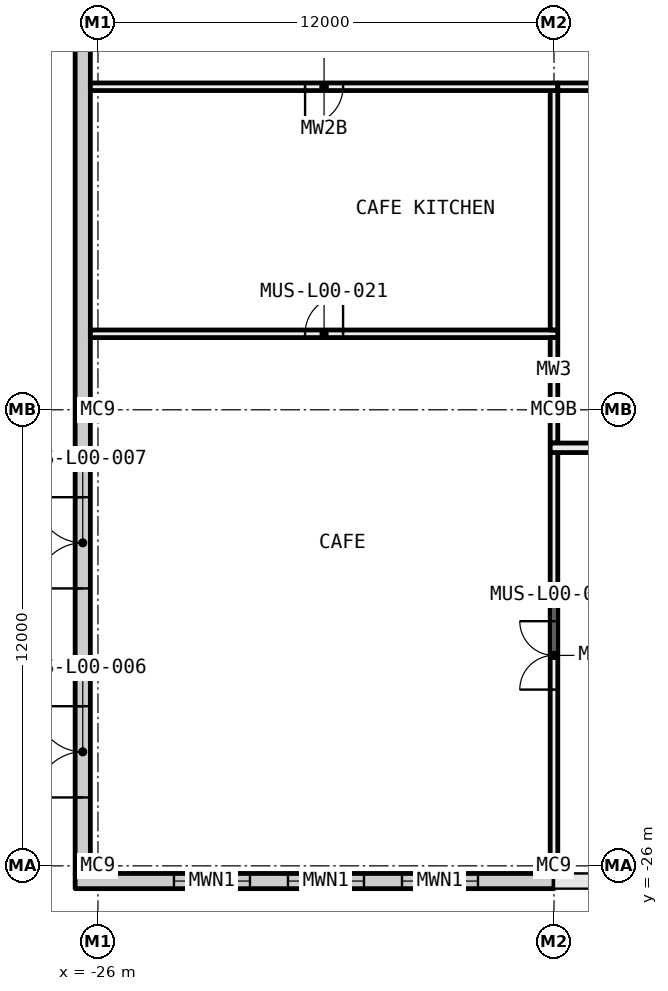
"""IFC4 building model, lengths in metres.
Left out: names, types, materials, properties, quantities, classifications, styles, units other than length and angle.
Written with IfcOpenShell. Run it as: python <this file> out.ifc"""

import sys

from ifc_helpers import new_model, si_unit, direction, frame, frame_2d, origin, origin_2d, place, context, subcontext, project, spatial, rectangle, i_section, extrude, element, fill, save


model = new_model("IFC4")
c1 = context("Model", 3, precision=1e-05, world=origin(), true_north=direction((0.0, 1.0)))
c2 = subcontext(c1, "Body", "Model", "MODEL_VIEW")
j1 = project(units=[si_unit("LENGTHUNIT", "METRE"), si_unit("PLANEANGLEUNIT", "RADIAN")], contexts=[c1])
p1 = place(None, origin())
s1 = spatial("IfcSite", under=j1, at=p1, CompositionType="ELEMENT")
p2 = place(p1, origin())
s2 = spatial("IfcBuilding", under=s1, at=p2, CompositionType="ELEMENT")
p3 = place(p2, origin())
s3 = spatial("IfcBuildingStorey", under=s2, at=p3, CompositionType="ELEMENT", Elevation=0.0)
for number, where, z_axis, x_axis in (
    (1, (-26.0, -26.0, -1.0), (0.0, 0.0, 1.0), (1.0, 0.0, 0.0)),
    (2, (-26.0, -14.0, -1.0), (0.0, 0.0, 1.0), (1.0, 0.0, 0.0)),
    (3, (-14.0, -26.0, -1.0), (0.0, 0.0, 1.0), (1.0, 0.0, 0.0)),
    (4, (-14.0, -14.0, -1.0), (0.0, 0.0, 1.0), (1.0, 0.0, 0.0)),
):
    element("IfcColumn", number, at=place(p3, frame(where, z_axis=z_axis, x_axis=x_axis)), inside=s3, PredefinedType="COLUMN", context=c2, shape_type="SweptSolid", body=[
        extrude(i_section(OverallWidth=0.4, OverallDepth=0.4, WebThickness=0.013, FlangeThickness=0.021, FilletRadius=0.022, at=origin_2d()), origin(), (0.0, 0.0, 1.0), 6.6),
    ])
p4 = place(p3, frame((-26.2, -12.0, 0.0), z_axis=(0.0, 0.0, 1.0), x_axis=(1.0, 0.0, 0.0)))
e5 = element("IfcWall", 5, at=p4, inside=s3, PredefinedType="PARTITIONING", context=c2, shape_type="SweptSolid", body=[
    extrude(rectangle(XDim=12.3, YDim=0.2, at=frame_2d((6.15, 0.0))), origin(), (0.0, 0.0, 1.0), 5.6),
])
p5 = place(p4, frame((5.65, 0.0, 0.0)))
e6 = element("IfcOpeningElement", 6, at=p5, cuts=e5, PredefinedType="OPENING", context=c2, shape_type="SweptSolid", body=[
    extrude(rectangle(XDim=1.0, YDim=2.1, at=frame_2d((0.5, 1.05))), frame((0.0, 0.11, 0.0), z_axis=(0.0, -1.0, 0.0), x_axis=(1.0, 0.0, 0.0)), (0.0, 0.0, 1.0), 0.22),
])
p6 = place(p3, frame((-14.0, -14.875, 0.0), z_axis=(0.0, 0.0, 1.0), x_axis=(0.0, 1.0, 0.0)))
e7 = element("IfcWall", 7, at=p6, inside=s3, PredefinedType="PARTITIONING", context=c2, shape_type="SweptSolid", body=[
    extrude(rectangle(XDim=0.675, YDim=0.2, at=frame_2d((0.337, 0.0))), origin(), (0.0, 0.0, 1.0), 5.012),
])
p7 = place(p3, frame((-14.0, -13.8, 0.0), z_axis=(0.0, 0.0, 1.0), x_axis=(0.0, 1.0, 0.0)))
e8 = element("IfcWall", 8, at=p7, inside=s3, PredefinedType="PARTITIONING", context=c2, shape_type="SweptSolid", body=[
    extrude(rectangle(XDim=1.7, YDim=0.2, at=frame_2d((0.85, 0.0))), origin(), (0.0, 0.0, 1.0), 5.012),
])
p8 = place(p3, frame((-14.0, -11.9, 0.0), z_axis=(0.0, 0.0, 1.0), x_axis=(0.0, 1.0, 0.0)))
e9 = element("IfcWall", 9, at=p8, inside=s3, PredefinedType="PARTITIONING", context=c2, shape_type="SweptSolid", body=[
    extrude(rectangle(XDim=6.3, YDim=0.2, at=frame_2d((3.15, 0.0))), origin(), (0.0, 0.0, 1.0), 5.012),
])
p9 = place(p3, frame((-26.2, -5.5, 0.0), z_axis=(0.0, 0.0, 1.0), x_axis=(1.0, 0.0, 0.0)))
e10 = element("IfcWall", 10, at=p9, inside=s3, PredefinedType="PARTITIONING", context=c2, shape_type="SweptSolid", body=[
    extrude(rectangle(XDim=12.3, YDim=0.2, at=frame_2d((6.15, 0.0))), origin(), (0.0, 0.0, 1.0), 5.6),
])
p10 = place(p9, frame((5.65, 0.0, 0.0)))
e11 = element("IfcOpeningElement", 11, at=p10, cuts=e10, PredefinedType="OPENING", context=c2, shape_type="SweptSolid", body=[
    extrude(rectangle(XDim=1.0, YDim=2.1, at=frame_2d((0.5, 1.05))), frame((0.0, 0.11, 0.0), z_axis=(0.0, -1.0, 0.0), x_axis=(1.0, 0.0, 0.0)), (0.0, 0.0, 1.0), 0.22),
])
p11 = place(p3, frame((-13.9, -5.5, 0.0), z_axis=(0.0, 0.0, 1.0), x_axis=(1.0, 0.0, 0.0)))
e12 = element("IfcWall", 12, at=p11, inside=s3, PredefinedType="PARTITIONING", context=c2, shape_type="SweptSolid", body=[
    extrude(rectangle(XDim=8.5, YDim=0.2, at=frame_2d((4.25, 0.0))), origin(), (0.0, 0.0, 1.0), 5.6),
])
p12 = place(p11, frame((3.35, 0.0, 0.0)))
e13 = element("IfcOpeningElement", 13, at=p12, cuts=e12, PredefinedType="OPENING", context=c2, shape_type="SweptSolid", body=[
    extrude(rectangle(XDim=1.8, YDim=2.1, at=frame_2d((0.9, 1.05))), frame((0.0, 0.11, 0.0), z_axis=(0.0, -1.0, 0.0), x_axis=(1.0, 0.0, 0.0)), (0.0, 0.0, 1.0), 0.22),
])
p13 = place(p3, frame((-14.0, -25.8, 0.0), z_axis=(0.0, 0.0, 1.0), x_axis=(0.0, 1.0, 0.0)))
e14 = element("IfcWall", 14, at=p13, inside=s3, PredefinedType="PARTITIONING", context=c2, shape_type="SweptSolid", body=[
    extrude(rectangle(XDim=10.675, YDim=0.2, at=frame_2d((5.337, 0.0))), origin(), (0.0, 0.0, 1.0), 5.012),
])
p14 = place(p13, frame((4.438, 0.0, 0.0)))
e15 = element("IfcOpeningElement", 15, at=p14, cuts=e14, PredefinedType="OPENING", context=c2, shape_type="SweptSolid", body=[
    extrude(rectangle(XDim=1.8, YDim=2.1, at=frame_2d((0.9, 1.05))), frame((0.0, 0.11, 0.0), z_axis=(0.0, -1.0, 0.0), x_axis=(1.0, 0.0, 0.0)), (0.0, 0.0, 1.0), 0.22),
])
p15 = place(p3, frame((-14.1, -15.0, 0.0), z_axis=(0.0, 0.0, 1.0), x_axis=(1.0, 0.0, 0.0)))
e16 = element("IfcWall", 16, at=p15, inside=s3, PredefinedType="PARTITIONING", context=c2, shape_type="SweptSolid", body=[
    extrude(rectangle(XDim=8.5, YDim=0.25, at=frame_2d((4.25, 0.0))), origin(), (0.0, 0.0, 1.0), 5.6),
])
p16 = place(p15, frame((3.35, 0.0, 0.0)))
e17 = element("IfcOpeningElement", 17, at=p16, cuts=e16, PredefinedType="OPENING", context=c2, shape_type="SweptSolid", body=[
    extrude(rectangle(XDim=1.8, YDim=2.1, at=frame_2d((0.9, 1.05))), frame((0.0, 0.135, 0.0), z_axis=(0.0, -1.0, 0.0), x_axis=(1.0, 0.0, 0.0)), (0.0, 0.0, 1.0), 0.27),
])
p17 = place(p3, frame((-26.6, -26.4, -0.4), z_axis=(0.0, 0.0, 1.0), x_axis=(1.0, 0.0, 0.0)))
e18 = element("IfcWall", 18, at=p17, inside=s3, PredefinedType="STANDARD", context=c2, shape_type="SweptSolid", body=[
    extrude(rectangle(XDim=12.6, YDim=0.4, at=frame_2d((6.3, 0.0))), origin(), (0.0, 0.0, 1.0), 6.0),
])
p18 = place(p17, frame((2.6, 0.0, 1.3)))
e19 = element("IfcOpeningElement", 19, at=p18, cuts=e18, PredefinedType="OPENING", context=c2, shape_type="SweptSolid", body=[
    extrude(rectangle(XDim=2.0, YDim=3.6, at=frame_2d((1.0, 1.8))), frame((0.0, 0.21, 0.0), z_axis=(0.0, -1.0, 0.0), x_axis=(1.0, 0.0, 0.0)), (0.0, 0.0, 1.0), 0.42),
])
p19 = place(p17, frame((5.6, 0.0, 1.3)))
e20 = element("IfcOpeningElement", 20, at=p19, cuts=e18, PredefinedType="OPENING", context=c2, shape_type="SweptSolid", body=[
    extrude(rectangle(XDim=2.0, YDim=3.6, at=frame_2d((1.0, 1.8))), frame((0.0, 0.21, 0.0), z_axis=(0.0, -1.0, 0.0), x_axis=(1.0, 0.0, 0.0)), (0.0, 0.0, 1.0), 0.42),
])
p20 = place(p17, frame((8.6, 0.0, 1.3)))
e21 = element("IfcOpeningElement", 21, at=p20, cuts=e18, PredefinedType="OPENING", context=c2, shape_type="SweptSolid", body=[
    extrude(rectangle(XDim=2.0, YDim=3.6, at=frame_2d((1.0, 1.8))), frame((0.0, 0.21, 0.0), z_axis=(0.0, -1.0, 0.0), x_axis=(1.0, 0.0, 0.0)), (0.0, 0.0, 1.0), 0.42),
])
p21 = place(p3, frame((-26.4, -26.2, -0.4), z_axis=(0.0, 0.0, 1.0), x_axis=(0.0, 1.0, 0.0)))
e22 = element("IfcWall", 22, at=p21, inside=s3, PredefinedType="STANDARD", context=c2, shape_type="SweptSolid", body=[
    extrude(rectangle(XDim=72.4, YDim=0.4, at=frame_2d((36.2, 0.0))), origin(), (0.0, 0.0, 1.0), 6.0),
])
p22 = place(p21, frame((29.4, 0.0, 0.4)))
e23 = element("IfcOpeningElement", 23, at=p22, cuts=e22, PredefinedType="OPENING", context=c2, shape_type="SweptSolid", body=[
    extrude(rectangle(XDim=3.6, YDim=4.2, at=frame_2d((1.8, 2.1))), frame((0.0, 0.21, 0.0), z_axis=(0.0, -1.0, 0.0), x_axis=(1.0, 0.0, 0.0)), (0.0, 0.0, 1.0), 0.42),
])
p23 = place(p21, frame((2.0, 0.0, 0.4)))
e24 = element("IfcOpeningElement", 24, at=p23, cuts=e22, PredefinedType="OPENING", context=c2, shape_type="SweptSolid", body=[
    extrude(rectangle(XDim=2.4, YDim=2.4, at=frame_2d((1.2, 1.2))), frame((0.0, 0.21, 0.0), z_axis=(0.0, -1.0, 0.0), x_axis=(1.0, 0.0, 0.0)), (0.0, 0.0, 1.0), 0.42),
])
p24 = place(p21, frame((7.5, 0.0, 0.4)))
e25 = element("IfcOpeningElement", 25, at=p24, cuts=e22, PredefinedType="OPENING", context=c2, shape_type="SweptSolid", body=[
    extrude(rectangle(XDim=2.4, YDim=2.4, at=frame_2d((1.2, 1.2))), frame((0.0, 0.21, 0.0), z_axis=(0.0, -1.0, 0.0), x_axis=(1.0, 0.0, 0.0)), (0.0, 0.0, 1.0), 0.42),
])
p25 = place(p18, origin())
e26 = element("IfcWindow", 26, at=p25, inside=s3, PartitioningType="SINGLE_PANEL", PredefinedType="WINDOW", context=c2, shape_type="SweptSolid", body=[
    extrude(rectangle(XDim=2.0, YDim=3.6, at=frame_2d((1.0, 1.8))), frame((0.0, 0.03, 0.0), z_axis=(0.0, -1.0, 0.0), x_axis=(1.0, 0.0, 0.0)), (0.0, 0.0, 1.0), 0.06),
])
fill(e19, e26)
p26 = place(p19, origin())
e27 = element("IfcWindow", 27, at=p26, inside=s3, PartitioningType="SINGLE_PANEL", PredefinedType="WINDOW", context=c2, shape_type="SweptSolid", body=[
    extrude(rectangle(XDim=2.0, YDim=3.6, at=frame_2d((1.0, 1.8))), frame((0.0, 0.03, 0.0), z_axis=(0.0, -1.0, 0.0), x_axis=(1.0, 0.0, 0.0)), (0.0, 0.0, 1.0), 0.06),
])
fill(e20, e27)
p27 = place(p20, origin())
e28 = element("IfcWindow", 28, at=p27, inside=s3, PartitioningType="SINGLE_PANEL", PredefinedType="WINDOW", context=c2, shape_type="SweptSolid", body=[
    extrude(rectangle(XDim=2.0, YDim=3.6, at=frame_2d((1.0, 1.8))), frame((0.0, 0.03, 0.0), z_axis=(0.0, -1.0, 0.0), x_axis=(1.0, 0.0, 0.0)), (0.0, 0.0, 1.0), 0.06),
])
fill(e21, e28)
p28 = place(p23, origin())
e29 = element("IfcDoor", 29, at=p28, inside=s3, OperationType="DOUBLE_DOOR_SINGLE_SWING", PredefinedType="DOOR", context=c2, shape_type="SweptSolid", body=[
    extrude(rectangle(XDim=2.4, YDim=2.4, at=frame_2d((1.2, 1.2))), frame((0.0, 0.025, 0.0), z_axis=(0.0, -1.0, 0.0), x_axis=(1.0, 0.0, 0.0)), (0.0, 0.0, 1.0), 0.05),
])
fill(e24, e29)
p29 = place(p24, origin())
e30 = element("IfcDoor", 30, at=p29, inside=s3, OperationType="DOUBLE_DOOR_SINGLE_SWING", PredefinedType="DOOR", context=c2, shape_type="SweptSolid", body=[
    extrude(rectangle(XDim=2.4, YDim=2.4, at=frame_2d((1.2, 1.2))), frame((0.0, 0.025, 0.0), z_axis=(0.0, -1.0, 0.0), x_axis=(1.0, 0.0, 0.0)), (0.0, 0.0, 1.0), 0.05),
])
fill(e25, e30)
p30 = place(p14, origin())
e31 = element("IfcDoor", 31, at=p30, inside=s3, OperationType="DOUBLE_DOOR_SINGLE_SWING", PredefinedType="DOOR", context=c2, shape_type="SweptSolid", body=[
    extrude(rectangle(XDim=1.8, YDim=2.1, at=frame_2d((0.9, 1.05))), frame((0.0, 0.025, 0.0), z_axis=(0.0, -1.0, 0.0), x_axis=(1.0, 0.0, 0.0)), (0.0, 0.0, 1.0), 0.05),
])
fill(e15, e31)
p31 = place(p5, origin())
e32 = element("IfcDoor", 32, at=p31, inside=s3, OperationType="SINGLE_SWING_LEFT", PredefinedType="DOOR", context=c2, shape_type="SweptSolid", body=[
    extrude(rectangle(XDim=1.0, YDim=2.1, at=frame_2d((0.5, 1.05))), frame((0.0, 0.025, 0.0), z_axis=(0.0, -1.0, 0.0), x_axis=(1.0, 0.0, 0.0)), (0.0, 0.0, 1.0), 0.05),
])
fill(e6, e32)
p32 = place(p10, frame((1.0, 0.0, 0.0), x_axis=(-1.0, 0.0, 0.0)))
e33 = element("IfcDoor", 33, at=p32, inside=s3, OperationType="SINGLE_SWING_LEFT", PredefinedType="DOOR", context=c2, shape_type="SweptSolid", body=[
    extrude(rectangle(XDim=1.0, YDim=2.1, at=frame_2d((0.5, 1.05))), frame((0.0, 0.025, 0.0), z_axis=(0.0, -1.0, 0.0), x_axis=(1.0, 0.0, 0.0)), (0.0, 0.0, 1.0), 0.05),
])
fill(e11, e33)
save(model, sys.argv[1])
